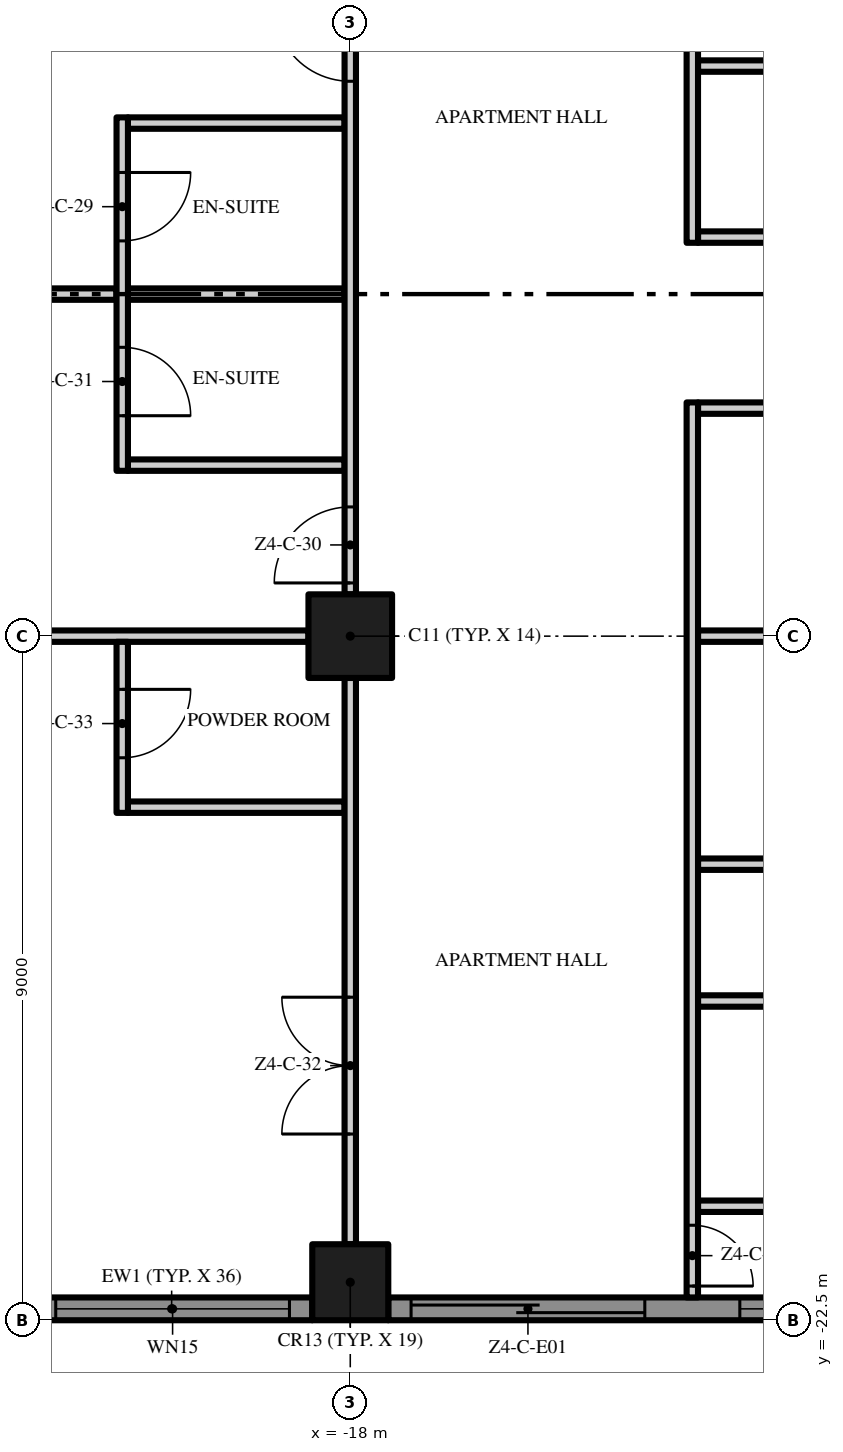
"""IFC4 building model, lengths in metres.
Left out: names, types, materials, properties, quantities, classifications, styles, units other than length and angle.
Written with IfcOpenShell. Run it as: python <this file> out.ifc"""

import sys

from ifc_helpers import new_model, si_unit, direction, frame, frame_2d, origin, origin_2d, place, context, subcontext, project, spatial, polyline, rectangle, outline, extrude, element, fill, save


model = new_model("IFC4")
c1 = context("Model", 3, precision=1e-05, world=origin(), true_north=direction((0.0, 1.0)))
c2 = subcontext(c1, "Body", "Model", "MODEL_VIEW")
j1 = project(units=[si_unit("LENGTHUNIT", "METRE"), si_unit("PLANEANGLEUNIT", "RADIAN")], contexts=[c1])
p1 = place(None, origin())
s1 = spatial("IfcSite", under=j1, at=p1, CompositionType="ELEMENT")
p2 = place(p1, origin())
s2 = spatial("IfcBuilding", under=s1, at=p2, CompositionType="ELEMENT")
p3 = place(p2, frame((0.0, 0.0, 207.2)))
s3 = spatial("IfcBuildingStorey", under=s2, at=p3, CompositionType="ELEMENT", Elevation=207.2)
p4 = place(p3, frame((-18.0, -13.5, 0.0), z_axis=(0.0, 0.0, 1.0), x_axis=(1.0, 0.0, 0.0)))
e1 = element("IfcColumn", 1, at=p4, inside=s3, PredefinedType="COLUMN", context=c2, shape_type="SweptSolid", body=[
    extrude(rectangle(XDim=1.1, YDim=1.1, at=origin_2d()), origin(), (0.0, 0.0, 1.0), 3.5),
])
p5 = place(p3, frame((-18.0, -22.0, 0.0), z_axis=(0.0, 0.0, 1.0), x_axis=(1.0, 0.0, 0.0)))
e2 = element("IfcColumn", 2, at=p5, inside=s3, PredefinedType="COLUMN", context=c2, shape_type="SweptSolid", body=[
    extrude(rectangle(XDim=1.0, YDim=1.0, at=origin_2d()), origin(), (0.0, 0.0, 1.0), 3.5),
])
p6 = place(p3, frame((-18.5, -22.35, 0.0), z_axis=(0.0, 0.0, 1.0), x_axis=(-1.0, 0.0, 0.0)))
e3 = element("IfcWall", 3, at=p6, inside=s3, PredefinedType="SOLIDWALL", context=c2, shape_type="SweptSolid", body=[
    extrude(rectangle(XDim=3.7, YDim=0.3, at=frame_2d((1.85, 0.0))), origin(), (0.0, 0.0, 1.0), 3.5),
])
p7 = place(p6, frame((0.3, 0.0, 0.45)))
e4 = element("IfcOpeningElement", 4, at=p7, cuts=e3, PredefinedType="OPENING", context=c2, shape_type="SweptSolid", body=[
    extrude(rectangle(XDim=3.075, YDim=2.65, at=frame_2d((1.538, 1.325))), frame((0.0, 0.16, 0.0), z_axis=(0.0, -1.0, 0.0), x_axis=(1.0, 0.0, 0.0)), (0.0, 0.0, 1.0), 0.32),
])
p8 = place(p3, frame((-9.5, -22.35, 0.0), z_axis=(0.0, 0.0, 1.0), x_axis=(-1.0, 0.0, 0.0)))
e5 = element("IfcWall", 5, at=p8, inside=s3, PredefinedType="SOLIDWALL", context=c2, shape_type="SweptSolid", body=[
    extrude(rectangle(XDim=8.0, YDim=0.3, at=frame_2d((4.0, 0.0))), origin(), (0.0, 0.0, 1.0), 3.5),
])
p9 = place(p8, frame((4.625, 0.0, 0.0)))
e6 = element("IfcOpeningElement", 6, at=p9, cuts=e5, PredefinedType="OPENING", context=c2, shape_type="SweptSolid", body=[
    extrude(rectangle(XDim=3.075, YDim=2.4, at=frame_2d((1.538, 1.2))), frame((0.0, 0.16, 0.0), z_axis=(0.0, -1.0, 0.0), x_axis=(1.0, 0.0, 0.0)), (0.0, 0.0, 1.0), 0.32),
])
p10 = place(p8, frame((0.3, 0.0, 0.45)))
e7 = element("IfcOpeningElement", 7, at=p10, cuts=e5, PredefinedType="OPENING", context=c2, shape_type="SweptSolid", body=[
    extrude(rectangle(XDim=3.075, YDim=2.65, at=frame_2d((1.538, 1.325))), frame((0.0, 0.16, 0.0), z_axis=(0.0, -1.0, 0.0), x_axis=(1.0, 0.0, 0.0)), (0.0, 0.0, 1.0), 0.32),
])
p11 = place(p3, origin())
e8 = element("IfcWall", 8, at=p11, inside=s3, PredefinedType="USERDEFINED", context=c2, shape_type="SweptSolid", body=[
    extrude(outline(polyline([(-22.5, -23.451), (-21.0, -24.112), (-19.5, -24.845), (-18.0, -25.369), (-16.875, -25.5), (-16.5, -25.485), (-15.0, -25.149), (-13.5, -24.488), (-12.0, -23.755), (-10.5, -23.231), (-9.375, -23.1), (-9.0, -23.115), (-7.5, -23.451), (-6.0, -24.112), (-4.5, -24.845), (-3.0, -25.369), (-1.875, -25.5), (-1.5, -25.485), (0.0, -25.149), (1.5, -24.488), (3.0, -23.755), (4.5, -23.231), (5.625, -23.1), (6.0, -23.115), (7.5, -23.451), (9.0, -24.112), (10.5, -24.845), (12.0, -25.369), (13.125, -25.5), (13.5, -25.485), (15.0, -25.149), (16.5, -24.488), (18.0, -23.755), (19.5, -23.231), (20.625, -23.1), (21.0, -23.115), (22.5, -23.451), (22.555, -23.208), (21.033, -22.866), (20.615, -22.849), (19.444, -22.986), (17.904, -23.524), (16.395, -24.261), (14.921, -24.91), (13.467, -25.236), (13.135, -25.249), (12.056, -25.124), (10.596, -24.614), (9.105, -23.885), (7.579, -23.213), (6.033, -22.866), (5.615, -22.849), (4.444, -22.986), (2.904, -23.524), (1.395, -24.261), (-0.079, -24.91), (-1.533, -25.236), (-1.865, -25.249), (-2.944, -25.124), (-4.404, -24.614), (-5.895, -23.885), (-7.421, -23.213), (-8.967, -22.866), (-9.385, -22.849), (-10.556, -22.986), (-12.096, -23.524), (-13.605, -24.261), (-15.079, -24.91), (-16.533, -25.236), (-16.865, -25.249), (-17.944, -25.124), (-19.404, -24.614), (-20.895, -23.885), (-22.399, -23.223), (-22.5, -23.451)])), origin(), (0.0, 0.0, 1.0), 0.9),
])
for number, where, z_axis, x_axis in (
    (9, (-13.425, -21.0, 0.0), (0.0, 0.0, 1.0), (1.0, 0.0, 0.0)),
    (10, (-13.425, -18.3, 0.0), (0.0, 0.0, 1.0), (1.0, 0.0, 0.0)),
    (11, (-13.425, -16.5, 0.0), (0.0, 0.0, 1.0), (1.0, 0.0, 0.0)),
):
    element("IfcWall", number, at=place(p3, frame(where, z_axis=z_axis, x_axis=x_axis)), inside=s3, PredefinedType="PARTITIONING", context=c2, shape_type="SweptSolid", body=[
        extrude(rectangle(XDim=4.35, YDim=0.15, at=frame_2d((2.175, 0.0))), origin(), (0.0, 0.0, 1.0), 3.5),
    ])
p12 = place(p3, frame((-20.925, -15.75, 0.0), z_axis=(0.0, 0.0, 1.0), x_axis=(1.0, 0.0, 0.0)))
e12 = element("IfcWall", 12, at=p12, inside=s3, PredefinedType="PARTITIONING", context=c2, shape_type="SweptSolid", body=[
    extrude(rectangle(XDim=2.85, YDim=0.15, at=frame_2d((1.425, 0.0))), origin(), (0.0, 0.0, 1.0), 3.5),
])
p13 = place(p3, frame((-26.0, -13.5, 0.0), z_axis=(0.0, 0.0, 1.0), x_axis=(1.0, 0.0, 0.0)))
e13 = element("IfcWall", 13, at=p13, inside=s3, PredefinedType="PARTITIONING", context=c2, shape_type="SweptSolid", body=[
    extrude(rectangle(XDim=7.45, YDim=0.15, at=frame_2d((3.725, 0.0))), origin(), (0.0, 0.0, 1.0), 3.5),
])
p14 = place(p3, frame((-13.425, -13.5, 0.0), z_axis=(0.0, 0.0, 1.0), x_axis=(1.0, 0.0, 0.0)))
e14 = element("IfcWall", 14, at=p14, inside=s3, PredefinedType="PARTITIONING", context=c2, shape_type="SweptSolid", body=[
    extrude(rectangle(XDim=3.875, YDim=0.15, at=frame_2d((1.938, 0.0))), origin(), (0.0, 0.0, 1.0), 3.5),
])
p15 = place(p3, frame((-20.925, -11.25, 0.0), z_axis=(0.0, 0.0, 1.0), x_axis=(1.0, 0.0, 0.0)))
e15 = element("IfcWall", 15, at=p15, inside=s3, PredefinedType="PARTITIONING", context=c2, shape_type="SweptSolid", body=[
    extrude(rectangle(XDim=2.85, YDim=0.15, at=frame_2d((1.425, 0.0))), origin(), (0.0, 0.0, 1.0), 3.5),
])
p16 = place(p3, frame((-13.425, -10.5, 0.0), z_axis=(0.0, 0.0, 1.0), x_axis=(1.0, 0.0, 0.0)))
e16 = element("IfcWall", 16, at=p16, inside=s3, PredefinedType="PARTITIONING", context=c2, shape_type="SweptSolid", body=[
    extrude(rectangle(XDim=4.35, YDim=0.15, at=frame_2d((2.175, 0.0))), origin(), (0.0, 0.0, 1.0), 3.5),
])
p17 = place(p3, frame((-26.7, -9.0, 0.0), z_axis=(0.0, 0.0, 1.0), x_axis=(1.0, 0.0, 0.0)))
e17 = element("IfcWall", 17, at=p17, inside=s3, PredefinedType="PARTITIONING", context=c2, shape_type="SweptSolid", body=[
    extrude(rectangle(XDim=5.625, YDim=0.15, at=frame_2d((2.812, 0.0))), origin(), (0.0, 0.0, 1.0), 3.5),
])
p18 = place(p3, frame((-20.925, -9.0, 0.0), z_axis=(0.0, 0.0, 1.0), x_axis=(1.0, 0.0, 0.0)))
e18 = element("IfcWall", 18, at=p18, inside=s3, PredefinedType="PARTITIONING", context=c2, shape_type="SweptSolid", body=[
    extrude(rectangle(XDim=2.85, YDim=0.15, at=frame_2d((1.425, 0.0))), origin(), (0.0, 0.0, 1.0), 3.5),
])
p19 = place(p3, frame((-13.425, -8.25, 0.0), z_axis=(0.0, 0.0, 1.0), x_axis=(1.0, 0.0, 0.0)))
e19 = element("IfcWall", 19, at=p19, inside=s3, PredefinedType="PARTITIONING", context=c2, shape_type="SweptSolid", body=[
    extrude(rectangle(XDim=4.35, YDim=0.15, at=frame_2d((2.175, 0.0))), origin(), (0.0, 0.0, 1.0), 3.5),
])
p20 = place(p19, frame((1.75, 0.0, 0.0)))
e20 = element("IfcOpeningElement", 20, at=p20, cuts=e19, PredefinedType="OPENING", context=c2, shape_type="SweptSolid", body=[
    extrude(rectangle(XDim=0.9, YDim=2.1, at=frame_2d((0.45, 1.05))), frame((0.0, 0.085, 0.0), z_axis=(0.0, -1.0, 0.0), x_axis=(1.0, 0.0, 0.0)), (0.0, 0.0, 1.0), 0.17),
])
p21 = place(p3, frame((-20.925, -6.75, 0.0), z_axis=(0.0, 0.0, 1.0), x_axis=(1.0, 0.0, 0.0)))
e21 = element("IfcWall", 21, at=p21, inside=s3, PredefinedType="PARTITIONING", context=c2, shape_type="SweptSolid", body=[
    extrude(rectangle(XDim=2.85, YDim=0.15, at=frame_2d((1.425, 0.0))), origin(), (0.0, 0.0, 1.0), 3.5),
])
p22 = place(p3, frame((-13.425, -6.0, 0.0), z_axis=(0.0, 0.0, 1.0), x_axis=(1.0, 0.0, 0.0)))
e22 = element("IfcWall", 22, at=p22, inside=s3, PredefinedType="PARTITIONING", context=c2, shape_type="SweptSolid", body=[
    extrude(rectangle(XDim=4.35, YDim=0.15, at=frame_2d((2.175, 0.0))), origin(), (0.0, 0.0, 1.0), 3.5),
])
p23 = place(p3, frame((-21.0, -13.575, 0.0), z_axis=(0.0, 0.0, 1.0), x_axis=(0.0, -1.0, 0.0)))
e23 = element("IfcWall", 23, at=p23, inside=s3, PredefinedType="PARTITIONING", context=c2, shape_type="SweptSolid", body=[
    extrude(rectangle(XDim=2.25, YDim=0.15, at=frame_2d((1.125, 0.0))), origin(), (0.0, 0.0, 1.0), 3.5),
])
p24 = place(p23, frame((0.625, 0.0, 0.0)))
e24 = element("IfcOpeningElement", 24, at=p24, cuts=e23, PredefinedType="OPENING", context=c2, shape_type="SweptSolid", body=[
    extrude(rectangle(XDim=0.9, YDim=2.1, at=frame_2d((0.45, 1.05))), frame((0.0, 0.085, 0.0), z_axis=(0.0, -1.0, 0.0), x_axis=(1.0, 0.0, 0.0)), (0.0, 0.0, 1.0), 0.17),
])
p25 = place(p3, frame((-21.0, -6.675, 0.0), z_axis=(0.0, 0.0, 1.0), x_axis=(0.0, -1.0, 0.0)))
e25 = element("IfcWall", 25, at=p25, inside=s3, PredefinedType="PARTITIONING", context=c2, shape_type="SweptSolid", body=[
    extrude(rectangle(XDim=4.65, YDim=0.15, at=frame_2d((2.325, 0.0))), origin(), (0.0, 0.0, 1.0), 3.5),
])
p26 = place(p25, frame((0.725, 0.0, 0.0)))
e26 = element("IfcOpeningElement", 26, at=p26, cuts=e25, PredefinedType="OPENING", context=c2, shape_type="SweptSolid", body=[
    extrude(rectangle(XDim=0.9, YDim=2.1, at=frame_2d((0.45, 1.05))), frame((0.0, 0.085, 0.0), z_axis=(0.0, -1.0, 0.0), x_axis=(1.0, 0.0, 0.0)), (0.0, 0.0, 1.0), 0.17),
])
p27 = place(p25, frame((3.025, 0.0, 0.0)))
e27 = element("IfcOpeningElement", 27, at=p27, cuts=e25, PredefinedType="OPENING", context=c2, shape_type="SweptSolid", body=[
    extrude(rectangle(XDim=0.9, YDim=2.1, at=frame_2d((0.45, 1.05))), frame((0.0, 0.085, 0.0), z_axis=(0.0, -1.0, 0.0), x_axis=(1.0, 0.0, 0.0)), (0.0, 0.0, 1.0), 0.17),
])
p28 = place(p3, frame((-18.0, -21.5, 0.0), z_axis=(0.0, 0.0, 1.0), x_axis=(0.0, 1.0, 0.0)))
e28 = element("IfcWall", 28, at=p28, inside=s3, PredefinedType="PARTITIONING", context=c2, shape_type="SweptSolid", body=[
    extrude(rectangle(XDim=7.45, YDim=0.15, at=frame_2d((3.725, 0.0))), origin(), (0.0, 0.0, 1.0), 3.5),
])
p29 = place(p28, frame((1.45, 0.0, 0.0)))
e29 = element("IfcOpeningElement", 29, at=p29, cuts=e28, PredefinedType="OPENING", context=c2, shape_type="SweptSolid", body=[
    extrude(rectangle(XDim=1.8, YDim=2.4, at=frame_2d((0.9, 1.2))), frame((0.0, 0.085, 0.0), z_axis=(0.0, -1.0, 0.0), x_axis=(1.0, 0.0, 0.0)), (0.0, 0.0, 1.0), 0.17),
])
p30 = place(p3, frame((-18.0, -12.95, 0.0), z_axis=(0.0, 0.0, 1.0), x_axis=(0.0, 1.0, 0.0)))
e30 = element("IfcWall", 30, at=p30, inside=s3, PredefinedType="PARTITIONING", context=c2, shape_type="SweptSolid", body=[
    extrude(rectangle(XDim=7.9, YDim=0.15, at=frame_2d((3.95, 0.0))), origin(), (0.0, 0.0, 1.0), 3.5),
])
p31 = place(p30, frame((6.75, 0.0, 0.0)))
e31 = element("IfcOpeningElement", 31, at=p31, cuts=e30, PredefinedType="OPENING", context=c2, shape_type="SweptSolid", body=[
    extrude(rectangle(XDim=1.0, YDim=2.4, at=frame_2d((0.5, 1.2))), frame((0.0, 0.085, 0.0), z_axis=(0.0, -1.0, 0.0), x_axis=(1.0, 0.0, 0.0)), (0.0, 0.0, 1.0), 0.17),
])
p32 = place(p30, frame((0.15, 0.0, 0.0)))
e32 = element("IfcOpeningElement", 32, at=p32, cuts=e30, PredefinedType="OPENING", context=c2, shape_type="SweptSolid", body=[
    extrude(rectangle(XDim=1.0, YDim=2.4, at=frame_2d((0.5, 1.2))), frame((0.0, 0.085, 0.0), z_axis=(0.0, -1.0, 0.0), x_axis=(1.0, 0.0, 0.0)), (0.0, 0.0, 1.0), 0.17),
])
p33 = place(p3, frame((-13.5, -10.425, 0.0), z_axis=(0.0, 0.0, 1.0), x_axis=(0.0, -1.0, 0.0)))
e33 = element("IfcWall", 33, at=p33, inside=s3, PredefinedType="PARTITIONING", context=c2, shape_type="SweptSolid", body=[
    extrude(rectangle(XDim=11.775, YDim=0.15, at=frame_2d((5.888, 0.0))), origin(), (0.0, 0.0, 1.0), 3.5),
])
p34 = place(p33, frame((10.825, 0.0, 0.0)))
e34 = element("IfcOpeningElement", 34, at=p34, cuts=e33, PredefinedType="OPENING", context=c2, shape_type="SweptSolid", body=[
    extrude(rectangle(XDim=0.8, YDim=2.0, at=frame_2d((0.4, 1.0))), frame((0.0, 0.085, 0.0), z_axis=(0.0, -1.0, 0.0), x_axis=(1.0, 0.0, 0.0)), (0.0, 0.0, 1.0), 0.17),
])
p35 = place(p3, frame((-13.5, -8.325, 0.0), z_axis=(0.0, 0.0, 1.0), x_axis=(0.0, 1.0, 0.0)))
e35 = element("IfcWall", 35, at=p35, inside=s3, PredefinedType="PARTITIONING", context=c2, shape_type="SweptSolid", body=[
    extrude(rectangle(XDim=8.225, YDim=0.15, at=frame_2d((4.112, 0.0))), origin(), (0.0, 0.0, 1.0), 3.5),
])
p36 = place(p7, origin())
e36 = element("IfcWindow", 36, at=p36, inside=s3, PartitioningType="SINGLE_PANEL", PredefinedType="WINDOW", context=c2, shape_type="SweptSolid", body=[
    extrude(rectangle(XDim=3.075, YDim=2.65, at=frame_2d((1.538, 1.325))), frame((0.0, 0.03, 0.0), z_axis=(0.0, -1.0, 0.0), x_axis=(1.0, 0.0, 0.0)), (0.0, 0.0, 1.0), 0.06),
])
fill(e4, e36)
p37 = place(p9, origin())
e37 = element("IfcDoor", 37, at=p37, inside=s3, OperationType="SINGLE_SWING_LEFT", PredefinedType="DOOR", context=c2, shape_type="SweptSolid", body=[
    extrude(rectangle(XDim=3.075, YDim=2.4, at=frame_2d((1.538, 1.2))), frame((0.0, 0.025, 0.0), z_axis=(0.0, -1.0, 0.0), x_axis=(1.0, 0.0, 0.0)), (0.0, 0.0, 1.0), 0.05),
])
fill(e6, e37)
p38 = place(p10, origin())
e38 = element("IfcWindow", 38, at=p38, inside=s3, PartitioningType="SINGLE_PANEL", PredefinedType="WINDOW", context=c2, shape_type="SweptSolid", body=[
    extrude(rectangle(XDim=3.075, YDim=2.65, at=frame_2d((1.538, 1.325))), frame((0.0, 0.03, 0.0), z_axis=(0.0, -1.0, 0.0), x_axis=(1.0, 0.0, 0.0)), (0.0, 0.0, 1.0), 0.06),
])
fill(e7, e38)
p39 = place(p34, origin())
e39 = element("IfcDoor", 39, at=p39, inside=s3, OperationType="SINGLE_SWING_RIGHT", PredefinedType="DOOR", context=c2, shape_type="SweptSolid", body=[
    extrude(rectangle(XDim=0.8, YDim=2.0, at=frame_2d((0.4, 1.0))), frame((0.0, 0.025, 0.0), z_axis=(0.0, -1.0, 0.0), x_axis=(1.0, 0.0, 0.0)), (0.0, 0.0, 1.0), 0.05),
])
fill(e34, e39)
p40 = place(p31, origin())
e40 = element("IfcDoor", 40, at=p40, inside=s3, OperationType="SINGLE_SWING_RIGHT", PredefinedType="DOOR", context=c2, shape_type="SweptSolid", body=[
    extrude(rectangle(XDim=1.0, YDim=2.4, at=frame_2d((0.5, 1.2))), frame((0.0, 0.025, 0.0), z_axis=(0.0, -1.0, 0.0), x_axis=(1.0, 0.0, 0.0)), (0.0, 0.0, 1.0), 0.05),
])
fill(e31, e40)
p41 = place(p26, origin())
e41 = element("IfcDoor", 41, at=p41, inside=s3, OperationType="SINGLE_SWING_LEFT", PredefinedType="DOOR", context=c2, shape_type="SweptSolid", body=[
    extrude(rectangle(XDim=0.9, YDim=2.1, at=frame_2d((0.45, 1.05))), frame((0.0, 0.025, 0.0), z_axis=(0.0, -1.0, 0.0), x_axis=(1.0, 0.0, 0.0)), (0.0, 0.0, 1.0), 0.05),
])
fill(e26, e41)
p42 = place(p32, origin())
e42 = element("IfcDoor", 42, at=p42, inside=s3, OperationType="SINGLE_SWING_LEFT", PredefinedType="DOOR", context=c2, shape_type="SweptSolid", body=[
    extrude(rectangle(XDim=1.0, YDim=2.4, at=frame_2d((0.5, 1.2))), frame((0.0, 0.025, 0.0), z_axis=(0.0, -1.0, 0.0), x_axis=(1.0, 0.0, 0.0)), (0.0, 0.0, 1.0), 0.05),
])
fill(e32, e42)
p43 = place(p27, origin())
e43 = element("IfcDoor", 43, at=p43, inside=s3, OperationType="SINGLE_SWING_RIGHT", PredefinedType="DOOR", context=c2, shape_type="SweptSolid", body=[
    extrude(rectangle(XDim=0.9, YDim=2.1, at=frame_2d((0.45, 1.05))), frame((0.0, 0.025, 0.0), z_axis=(0.0, -1.0, 0.0), x_axis=(1.0, 0.0, 0.0)), (0.0, 0.0, 1.0), 0.05),
])
fill(e27, e43)
p44 = place(p29, origin())
e44 = element("IfcDoor", 44, at=p44, inside=s3, OperationType="DOUBLE_DOOR_SINGLE_SWING", PredefinedType="DOOR", context=c2, shape_type="SweptSolid", body=[
    extrude(rectangle(XDim=1.8, YDim=2.4, at=frame_2d((0.9, 1.2))), frame((0.0, 0.025, 0.0), z_axis=(0.0, -1.0, 0.0), x_axis=(1.0, 0.0, 0.0)), (0.0, 0.0, 1.0), 0.05),
])
fill(e29, e44)
p45 = place(p24, origin())
e45 = element("IfcDoor", 45, at=p45, inside=s3, OperationType="SINGLE_SWING_LEFT", PredefinedType="DOOR", context=c2, shape_type="SweptSolid", body=[
    extrude(rectangle(XDim=0.9, YDim=2.1, at=frame_2d((0.45, 1.05))), frame((0.0, 0.025, 0.0), z_axis=(0.0, -1.0, 0.0), x_axis=(1.0, 0.0, 0.0)), (0.0, 0.0, 1.0), 0.05),
])
fill(e24, e45)
save(model, sys.argv[1])
